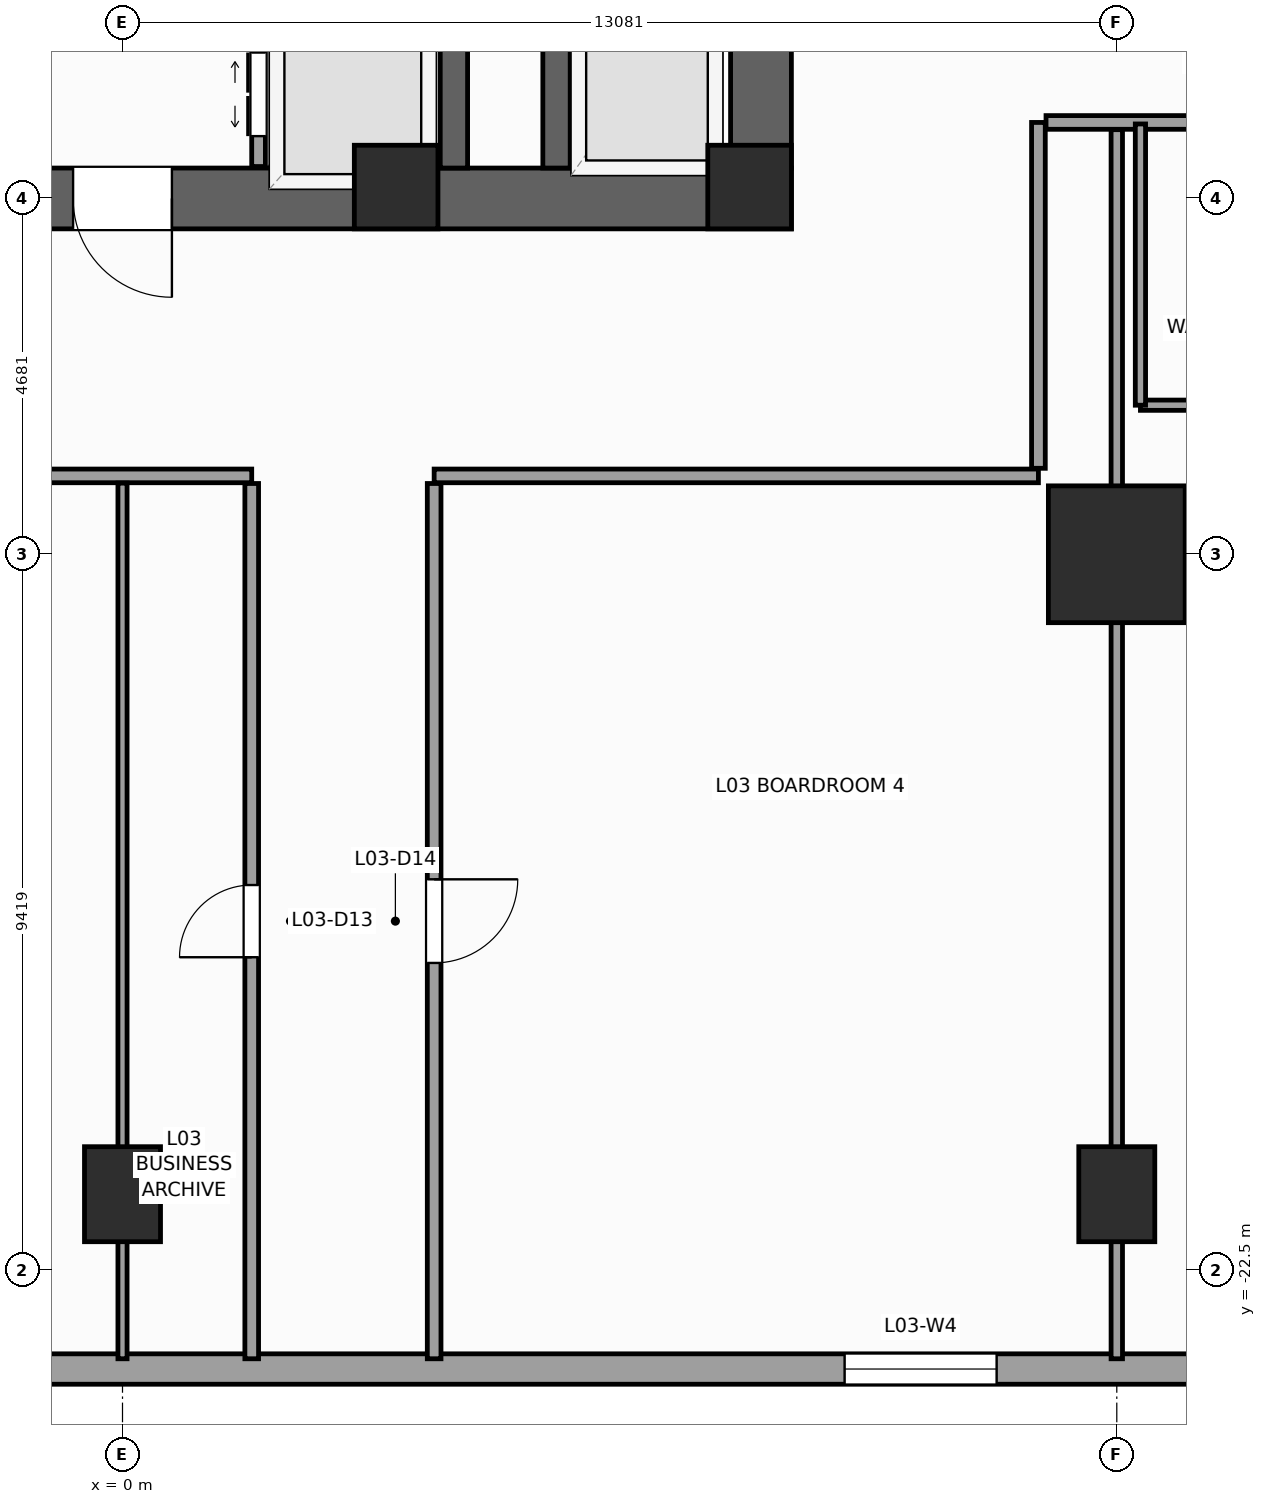
"""IFC4 building model, lengths in metres.
Left out: names, types, materials, properties, quantities, classifications, styles, units other than length and angle.
Written with IfcOpenShell. Run it as: python <this file> out.ifc"""

import sys

from ifc_helpers import new_model, si_unit, direction, frame, frame_2d, origin, origin_2d, place, context, subcontext, project, spatial, rectangle, extrude, source, transform, mapped, element, fill, save


model = new_model("IFC4")
c1 = context("Model", 3, precision=1e-05, world=origin(), true_north=direction((0.0, 1.0)))
c2 = subcontext(c1, "Body", "Model", "MODEL_VIEW")
j1 = project(units=[si_unit("LENGTHUNIT", "METRE"), si_unit("PLANEANGLEUNIT", "RADIAN")], contexts=[c1])
p1 = place(None, origin())
s1 = spatial("IfcSite", under=j1, at=p1, CompositionType="ELEMENT")
p2 = place(p1, origin())
s2 = spatial("IfcBuilding", under=s1, at=p2, CompositionType="ELEMENT")
p3 = place(p2, frame((0.0, 0.0, 16.0)))
s3 = spatial("IfcBuildingStorey", under=s2, at=p3, CompositionType="ELEMENT", Elevation=16.0)
p4 = place(p3, frame((-8.8, -8.4, 0.0), z_axis=(0.0, 0.0, 1.0), x_axis=(1.0, 0.0, 0.0)))
e1 = element("IfcWall", 1, at=p4, inside=s3, PredefinedType="SHEAR", context=c2, shape_type="SweptSolid", body=[
    extrude(rectangle(XDim=17.6, YDim=0.8, at=frame_2d((8.8, 0.0))), origin(), (0.0, 0.0, 1.0), 5.0),
])
p5 = place(p4, frame((8.15, 0.0, 0.0)))
e2 = element("IfcOpeningElement", 2, at=p5, cuts=e1, PredefinedType="OPENING", context=c2, shape_type="SweptSolid", body=[
    extrude(rectangle(XDim=1.3, YDim=2.2, at=frame_2d((0.65, 1.1))), frame((0.0, 0.41, 0.0), z_axis=(0.0, -1.0, 0.0), x_axis=(1.0, 0.0, 0.0)), (0.0, 0.0, 1.0), 0.82),
])
p6 = place(p3, frame((8.4, -8.0, 0.0), z_axis=(0.0, 0.0, 1.0), x_axis=(0.0, 1.0, 0.0)))
e3 = element("IfcWall", 3, at=p6, inside=s3, PredefinedType="SHEAR", context=c2, shape_type="SweptSolid", body=[
    extrude(rectangle(XDim=16.0, YDim=0.8, at=frame_2d((8.0, 0.0))), origin(), (0.0, 0.0, 1.0), 5.0),
])
p7 = place(p6, frame((4.69, 0.0, 0.0)))
e4 = element("IfcOpeningElement", 4, at=p7, cuts=e3, PredefinedType="OPENING", context=c2, shape_type="SweptSolid", body=[
    extrude(rectangle(XDim=1.3, YDim=2.2, at=frame_2d((0.65, 1.1))), frame((0.0, 0.41, 0.0), z_axis=(0.0, -1.0, 0.0), x_axis=(1.0, 0.0, 0.0)), (0.0, 0.0, 1.0), 0.82),
])
p8 = place(p3, frame((4.36, -8.0, 0.0), z_axis=(0.0, 0.0, 1.0), x_axis=(0.0, 1.0, 0.0)))
e5 = element("IfcWall", 5, at=p8, inside=s3, PredefinedType="SHEAR", context=c2, shape_type="SweptSolid", body=[
    extrude(rectangle(XDim=16.0, YDim=0.36, at=frame_2d((8.0, 0.0))), origin(), (0.0, 0.0, 1.0), 5.0),
])
p9 = place(p3, frame((5.71, -8.0, 0.0), z_axis=(0.0, 0.0, 1.0), x_axis=(0.0, 1.0, 0.0)))
e6 = element("IfcWall", 6, at=p9, inside=s3, PredefinedType="SHEAR", context=c2, shape_type="SweptSolid", body=[
    extrude(rectangle(XDim=2.54, YDim=0.36, at=frame_2d((1.27, 0.0))), origin(), (0.0, 0.0, 1.0), 5.0),
])
m1 = source(origin(), c2, "Body", "SweptSolid", [
    extrude(rectangle(XDim=1.1, YDim=1.1, at=origin_2d()), origin(), (0.0, 0.0, 1.0), 5.0),
])
for number, where, z_axis, x_axis in (
    (7, (8.25, -8.25, 0.0), (0.0, 0.0, 1.0), (1.0, 0.0, 0.0)),
    (8, (3.6, -8.25, 0.0), (0.0, 0.0, 1.0), (1.0, 0.0, 0.0)),
):
    element("IfcColumn", number, at=place(p3, frame(where, z_axis=z_axis, x_axis=x_axis)), inside=s3, PredefinedType="PILASTER", context=c2, shape_type="MappedRepresentation", body=[
        mapped(m1, transform((0.0, 0.0, 0.0), scale=1.0)),
    ])
m2 = source(origin(), c2, "Body", "SweptSolid", [
    extrude(rectangle(XDim=1.8, YDim=1.8, at=origin_2d()), origin(), (0.0, 0.0, 1.0), 5.0),
])
p10 = place(p3, frame((13.081, -13.081, 0.0), z_axis=(0.0, 0.0, 1.0), x_axis=(1.0, 0.0, 0.0)))
e9 = element("IfcColumn", 9, at=p10, inside=s3, PredefinedType="COLUMN", context=c2, shape_type="MappedRepresentation", body=[
    mapped(m2, transform((0.0, 0.0, 0.0), scale=1.0)),
])
m3 = source(origin(), c2, "Body", "SweptSolid", [
    extrude(rectangle(XDim=1.0, YDim=1.25, at=origin_2d()), origin(), (0.0, 0.0, 1.0), 5.0),
])
for number, where, z_axis, x_axis in (
    (10, (0.0, -21.5, 0.0), (0.0, 0.0, 1.0), (1.0, 0.0, 0.0)),
    (11, (13.081, -21.5, 0.0), (0.0, 0.0, 1.0), (1.0, 0.0, 0.0)),
):
    element("IfcColumn", number, at=place(p3, frame(where, z_axis=z_axis, x_axis=x_axis)), inside=s3, PredefinedType="COLUMN", context=c2, shape_type="MappedRepresentation", body=[
        mapped(m3, transform((0.0, 0.0, 0.0), scale=1.0)),
    ])
p11 = place(p3, frame((-2.0, -23.8, 0.0), z_axis=(0.0, 0.0, 1.0), x_axis=(1.0, 0.0, 0.0)))
e12 = element("IfcWall", 12, at=p11, inside=s3, PredefinedType="STANDARD", context=c2, shape_type="SweptSolid", body=[
    extrude(rectangle(XDim=35.0, YDim=0.4, at=frame_2d((17.5, 0.0))), origin(), (0.0, 0.0, 1.0), 4.66),
])
p12 = place(p11, frame((11.5, 0.0, 0.85)))
e13 = element("IfcOpeningElement", 13, at=p12, cuts=e12, PredefinedType="OPENING", context=c2, shape_type="SweptSolid", body=[
    extrude(rectangle(XDim=2.0, YDim=2.8, at=frame_2d((1.0, 1.4))), frame((0.0, 0.21, 0.0), z_axis=(0.0, -1.0, 0.0), x_axis=(1.0, 0.0, 0.0)), (0.0, 0.0, 1.0), 0.42),
])
p13 = place(p11, frame((17.0, 0.0, 0.85)))
e14 = element("IfcOpeningElement", 14, at=p13, cuts=e12, PredefinedType="OPENING", context=c2, shape_type="SweptSolid", body=[
    extrude(rectangle(XDim=2.0, YDim=2.8, at=frame_2d((1.0, 1.4))), frame((0.0, 0.21, 0.0), z_axis=(0.0, -1.0, 0.0), x_axis=(1.0, 0.0, 0.0)), (0.0, 0.0, 1.0), 0.42),
])
p14 = place(p11, frame((22.0, 0.0, 0.85)))
e15 = element("IfcOpeningElement", 15, at=p14, cuts=e12, PredefinedType="OPENING", context=c2, shape_type="SweptSolid", body=[
    extrude(rectangle(XDim=2.0, YDim=2.8, at=frame_2d((1.0, 1.4))), frame((0.0, 0.21, 0.0), z_axis=(0.0, -1.0, 0.0), x_axis=(1.0, 0.0, 0.0)), (0.0, 0.0, 1.0), 0.42),
])
p15 = place(p3, frame((1.79, -7.98, 0.0), z_axis=(0.0, 0.0, 1.0), x_axis=(0.0, 1.0, 0.0)))
e16 = element("IfcWall", 16, at=p15, inside=s3, PredefinedType="PARTITIONING", context=c2, shape_type="SweptSolid", body=[
    extrude(rectangle(XDim=12.38, YDim=0.18, at=frame_2d((6.19, 0.0))), origin(), (0.0, 0.0, 1.0), 4.66),
])
p16 = place(p15, frame((0.4, 0.0, 0.0)))
e17 = element("IfcOpeningElement", 17, at=p16, cuts=e16, PredefinedType="OPENING", context=c2, shape_type="SweptSolid", body=[
    extrude(rectangle(XDim=1.1, YDim=2.2, at=frame_2d((0.55, 1.1))), frame((0.0, 0.1, 0.0), z_axis=(0.0, -1.0, 0.0), x_axis=(1.0, 0.0, 0.0)), (0.0, 0.0, 1.0), 0.2),
])
p17 = place(p15, frame((2.46, 0.0, 0.0)))
e18 = element("IfcOpeningElement", 18, at=p17, cuts=e16, PredefinedType="OPENING", context=c2, shape_type="SweptSolid", body=[
    extrude(rectangle(XDim=1.1, YDim=2.2, at=frame_2d((0.55, 1.1))), frame((0.0, 0.1, 0.0), z_axis=(0.0, -1.0, 0.0), x_axis=(1.0, 0.0, 0.0)), (0.0, 0.0, 1.0), 0.2),
])
p18 = place(p3, frame((-12.05, -12.05, 0.0), z_axis=(0.0, 0.0, 1.0), x_axis=(1.0, 0.0, 0.0)))
e19 = element("IfcWall", 19, at=p18, inside=s3, PredefinedType="PARTITIONING", context=c2, shape_type="SweptSolid", body=[
    extrude(rectangle(XDim=13.75, YDim=0.18, at=frame_2d((6.875, 0.0))), origin(), (0.0, 0.0, 1.0), 4.66),
])
p19 = place(p18, frame((5.639, 0.0, 0.0)))
e20 = element("IfcOpeningElement", 20, at=p19, cuts=e19, PredefinedType="OPENING", context=c2, shape_type="SweptSolid", body=[
    extrude(rectangle(XDim=1.1, YDim=2.2, at=frame_2d((0.55, 1.1))), frame((0.0, 0.1, 0.0), z_axis=(0.0, -1.0, 0.0), x_axis=(1.0, 0.0, 0.0)), (0.0, 0.0, 1.0), 0.2),
])
p20 = place(p3, frame((4.1, -12.05, 0.0), z_axis=(0.0, 0.0, 1.0), x_axis=(1.0, 0.0, 0.0)))
e21 = element("IfcWall", 21, at=p20, inside=s3, PredefinedType="PARTITIONING", context=c2, shape_type="SweptSolid", body=[
    extrude(rectangle(XDim=7.95, YDim=0.18, at=frame_2d((3.975, 0.0))), origin(), (0.0, 0.0, 1.0), 4.66),
])
p21 = place(p3, frame((12.05, -11.95, 0.0), z_axis=(0.0, 0.0, 1.0), x_axis=(0.0, 1.0, 0.0)))
e22 = element("IfcWall", 22, at=p21, inside=s3, PredefinedType="PARTITIONING", context=c2, shape_type="SweptSolid", body=[
    extrude(rectangle(XDim=4.55, YDim=0.18, at=frame_2d((2.275, 0.0))), origin(), (0.0, 0.0, 1.0), 4.66),
])
p22 = place(p3, frame((12.15, -7.4, 0.0), z_axis=(0.0, 0.0, 1.0), x_axis=(1.0, 0.0, 0.0)))
e23 = element("IfcWall", 23, at=p22, inside=s3, PredefinedType="PARTITIONING", context=c2, shape_type="SweptSolid", body=[
    extrude(rectangle(XDim=20.515, YDim=0.18, at=frame_2d((10.258, 0.0))), origin(), (0.0, 0.0, 1.0), 4.66),
])
p23 = place(p22, frame((1.892, 0.0, 0.0)))
e24 = element("IfcOpeningElement", 24, at=p23, cuts=e23, PredefinedType="OPENING", context=c2, shape_type="SweptSolid", body=[
    extrude(rectangle(XDim=0.95, YDim=2.1, at=frame_2d((0.475, 1.05))), frame((0.0, 0.1, 0.0), z_axis=(0.0, -1.0, 0.0), x_axis=(1.0, 0.0, 0.0)), (0.0, 0.0, 1.0), 0.2),
])
p24 = place(p22, frame((11.283, 0.0, 0.0)))
e25 = element("IfcOpeningElement", 25, at=p24, cuts=e23, PredefinedType="OPENING", context=c2, shape_type="SweptSolid", body=[
    extrude(rectangle(XDim=1.1, YDim=2.2, at=frame_2d((0.55, 1.1))), frame((0.0, 0.1, 0.0), z_axis=(0.0, -1.0, 0.0), x_axis=(1.0, 0.0, 0.0)), (0.0, 0.0, 1.0), 0.2),
])
p25 = place(p3, frame((1.7, -23.665, 0.0), z_axis=(0.0, 0.0, 1.0), x_axis=(0.0, 1.0, 0.0)))
e26 = element("IfcWall", 26, at=p25, inside=s3, PredefinedType="PARTITIONING", context=c2, shape_type="SweptSolid", body=[
    extrude(rectangle(XDim=11.515, YDim=0.18, at=frame_2d((5.758, 0.0))), origin(), (0.0, 0.0, 1.0), 4.66),
])
p26 = place(p25, frame((5.282, 0.0, 0.0)))
e27 = element("IfcOpeningElement", 27, at=p26, cuts=e26, PredefinedType="OPENING", context=c2, shape_type="SweptSolid", body=[
    extrude(rectangle(XDim=0.95, YDim=2.15, at=frame_2d((0.475, 1.075))), frame((0.0, 0.1, 0.0), z_axis=(0.0, -1.0, 0.0), x_axis=(1.0, 0.0, 0.0)), (0.0, 0.0, 1.0), 0.2),
])
p27 = place(p3, frame((4.1, -23.665, 0.0), z_axis=(0.0, 0.0, 1.0), x_axis=(0.0, 1.0, 0.0)))
e28 = element("IfcWall", 28, at=p27, inside=s3, PredefinedType="PARTITIONING", context=c2, shape_type="SweptSolid", body=[
    extrude(rectangle(XDim=11.515, YDim=0.18, at=frame_2d((5.758, 0.0))), origin(), (0.0, 0.0, 1.0), 4.66),
])
p28 = place(p27, frame((5.208, 0.0, 0.0)))
e29 = element("IfcOpeningElement", 29, at=p28, cuts=e28, PredefinedType="OPENING", context=c2, shape_type="SweptSolid", body=[
    extrude(rectangle(XDim=1.1, YDim=2.2, at=frame_2d((0.55, 1.1))), frame((0.0, 0.1, 0.0), z_axis=(0.0, -1.0, 0.0), x_axis=(1.0, 0.0, 0.0)), (0.0, 0.0, 1.0), 0.2),
])
p29 = place(p3, frame((0.0, -23.665, 0.0), z_axis=(0.0, 0.0, 1.0), x_axis=(0.0, 1.0, 0.0)))
e30 = element("IfcWall", 30, at=p29, inside=s3, PredefinedType="PARTITIONING", context=c2, shape_type="SweptSolid", body=[
    extrude(rectangle(XDim=11.52, YDim=0.12, at=frame_2d((5.76, 0.0))), origin(), (0.0, 0.0, 1.0), 3.95),
])
p30 = place(p3, frame((13.081, -23.665, 0.0), z_axis=(0.0, 0.0, 1.0), x_axis=(0.0, 1.0, 0.0)))
e31 = element("IfcWall", 31, at=p30, inside=s3, PredefinedType="PARTITIONING", context=c2, shape_type="SweptSolid", body=[
    extrude(rectangle(XDim=16.17, YDim=0.15, at=frame_2d((8.085, 0.0))), origin(), (0.0, 0.0, 1.0), 3.652),
])
p31 = place(p3, frame((13.392, -11.12, 0.0), z_axis=(0.0, 0.0, 1.0), x_axis=(1.0, 0.0, 0.0)))
e32 = element("IfcWall", 32, at=p31, inside=s3, PredefinedType="PARTITIONING", context=c2, shape_type="SweptSolid", body=[
    extrude(rectangle(XDim=2.25, YDim=0.135, at=frame_2d((1.125, 0.0))), origin(), (0.0, 0.0, 1.0), 4.66),
])
p32 = place(p3, frame((13.392, -11.12, 0.0), z_axis=(0.0, 0.0, 1.0), x_axis=(0.0, 1.0, 0.0)))
e33 = element("IfcWall", 33, at=p32, inside=s3, PredefinedType="PARTITIONING", context=c2, shape_type="SweptSolid", body=[
    extrude(rectangle(XDim=3.7, YDim=0.135, at=frame_2d((1.85, 0.0))), origin(), (0.0, 0.0, 1.0), 4.66),
])
m4 = source(origin(), c2, "Body", "SweptSolid", [
    extrude(rectangle(XDim=2.0, YDim=2.8, at=frame_2d((1.0, 1.4))), frame((0.0, 0.03, 0.0), z_axis=(0.0, -1.0, 0.0), x_axis=(1.0, 0.0, 0.0)), (0.0, 0.0, 1.0), 0.06),
])
p33 = place(p12, origin())
e34 = element("IfcWindow", 34, at=p33, inside=s3, PartitioningType="SINGLE_PANEL", PredefinedType="WINDOW", context=c2, shape_type="MappedRepresentation", body=[
    mapped(m4, transform((0.0, 0.0, 0.0), scale=1.0)),
])
fill(e13, e34)
m5 = source(origin(), c2, "Body", "SweptSolid", [
    extrude(rectangle(XDim=1.3, YDim=2.2, at=frame_2d((0.65, 1.1))), frame((0.0, 0.025, 0.0), z_axis=(0.0, -1.0, 0.0), x_axis=(1.0, 0.0, 0.0)), (0.0, 0.0, 1.0), 0.05),
])
p34 = place(p5, frame((1.3, 0.0, 0.0), z_axis=(0.0, 0.0, 1.0), x_axis=(-1.0, 0.0, 0.0)))
e35 = element("IfcDoor", 35, at=p34, inside=s3, OperationType="SINGLE_SWING_RIGHT", PredefinedType="DOOR", context=c2, shape_type="MappedRepresentation", body=[
    mapped(m5, transform((0.0, 0.0, 0.0), scale=1.0)),
])
fill(e2, e35)
m6 = source(origin(), c2, "Body", "SweptSolid", [
    extrude(rectangle(XDim=1.1, YDim=2.2, at=frame_2d((0.55, 1.1))), frame((0.0, 0.025, 0.0), z_axis=(0.0, -1.0, 0.0), x_axis=(1.0, 0.0, 0.0)), (0.0, 0.0, 1.0), 0.05),
])
p35 = place(p16, origin())
e36 = element("IfcDoor", 36, at=p35, inside=s3, OperationType="DOUBLE_DOOR_SLIDING", PredefinedType="DOOR", context=c2, shape_type="MappedRepresentation", body=[
    mapped(m6, transform((0.0, 0.0, 0.0), scale=1.0)),
])
fill(e17, e36)
m7 = source(origin(), c2, "Body", "SweptSolid", [
    extrude(rectangle(XDim=0.95, YDim=2.15, at=frame_2d((0.475, 1.075))), frame((0.0, 0.025, 0.0), z_axis=(0.0, -1.0, 0.0), x_axis=(1.0, 0.0, 0.0)), (0.0, 0.0, 1.0), 0.05),
])
p36 = place(p26, origin())
e37 = element("IfcDoor", 37, at=p36, inside=s3, OperationType="SINGLE_SWING_LEFT", PredefinedType="DOOR", context=c2, shape_type="MappedRepresentation", body=[
    mapped(m7, transform((0.0, 0.0, 0.0), scale=1.0)),
])
fill(e27, e37)
p37 = place(p28, frame((1.1, 0.0, 0.0), z_axis=(0.0, 0.0, 1.0), x_axis=(-1.0, 0.0, 0.0)))
e38 = element("IfcDoor", 38, at=p37, inside=s3, OperationType="SINGLE_SWING_RIGHT", PredefinedType="DOOR", context=c2, shape_type="MappedRepresentation", body=[
    mapped(m6, transform((0.0, 0.0, 0.0), scale=1.0)),
])
fill(e29, e38)
save(model, sys.argv[1])
